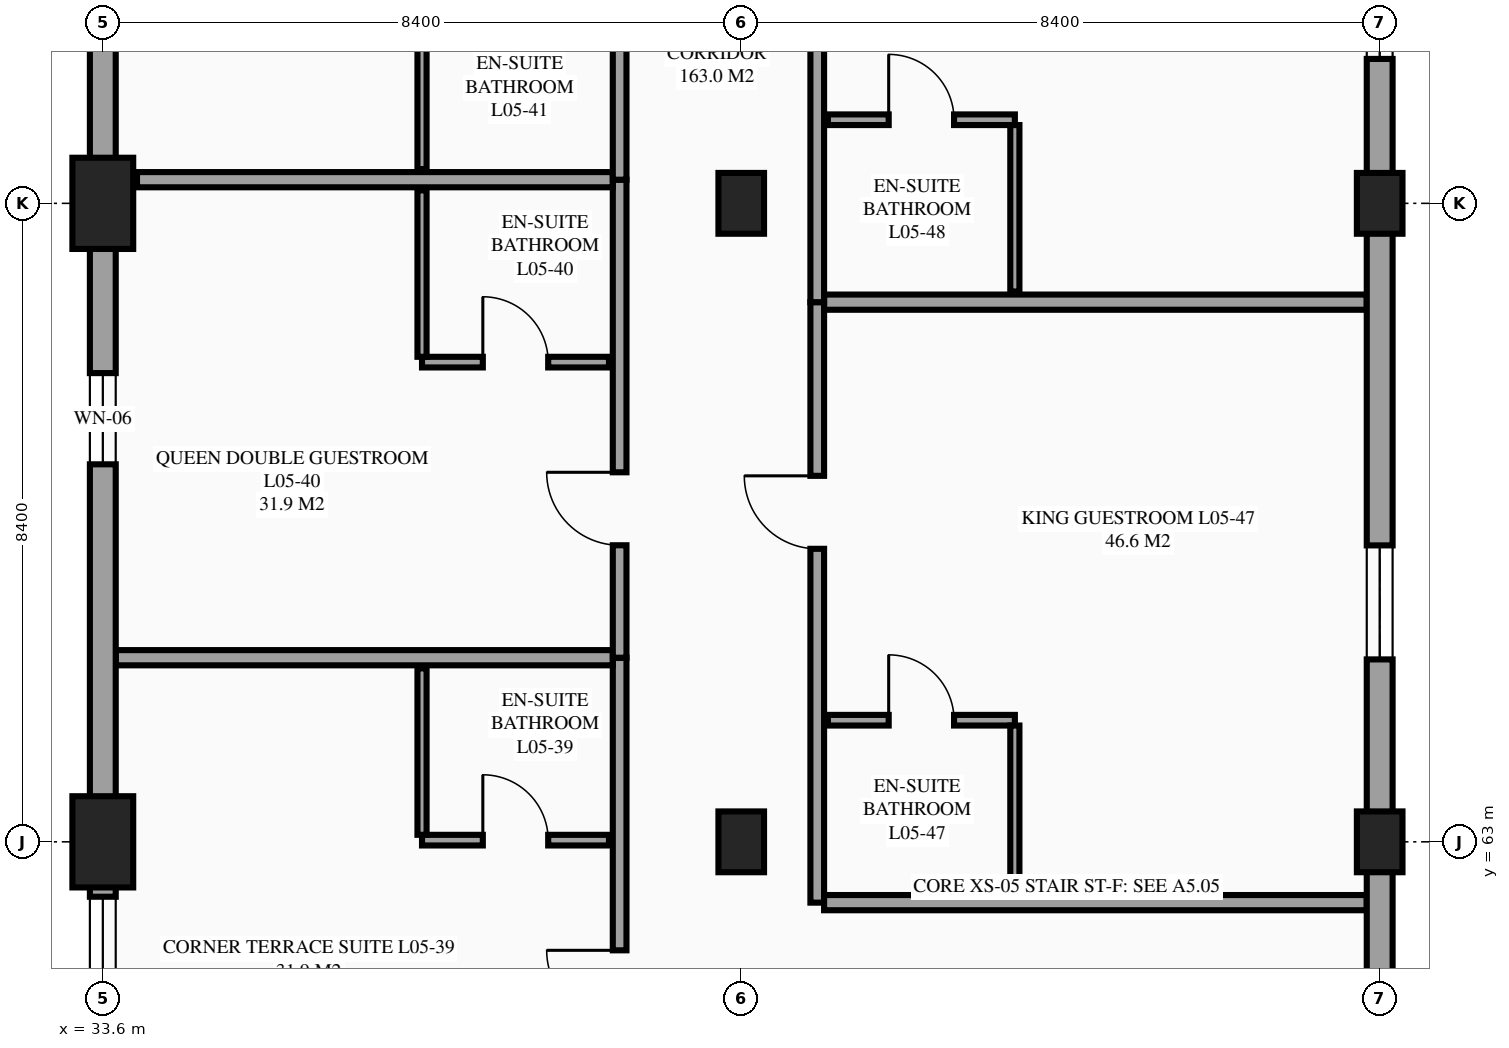
"""IFC4 building model, lengths in metres.
Left out: names, types, materials, properties, quantities, classifications, styles, units other than length and angle.
Written with IfcOpenShell. Run it as: python <this file> out.ifc"""

import sys

from ifc_helpers import new_model, si_unit, direction, frame, frame_2d, origin, origin_2d, place, context, subcontext, project, spatial, rectangle, extrude, element, fill, save


model = new_model("IFC4")
c1 = context("Model", 3, precision=1e-05, world=origin(), true_north=direction((0.0, 1.0)))
c2 = subcontext(c1, "Body", "Model", "MODEL_VIEW")
j1 = project(units=[si_unit("LENGTHUNIT", "METRE"), si_unit("PLANEANGLEUNIT", "RADIAN")], contexts=[c1])
p1 = place(None, origin())
s1 = spatial("IfcSite", under=j1, at=p1, CompositionType="ELEMENT")
p2 = place(p1, origin())
s2 = spatial("IfcBuilding", under=s1, at=p2, CompositionType="ELEMENT")
p3 = place(p2, frame((0.0, 0.0, 21.9)))
s3 = spatial("IfcBuildingStorey", under=s2, at=p3, CompositionType="ELEMENT", Elevation=21.9)
for number, where, z_axis, x_axis in (
    (1, (33.6, 63.0, 0.0), (0.0, 0.0, 1.0), (1.0, 0.0, 0.0)),
    (2, (33.6, 71.4, 0.0), (0.0, 0.0, 1.0), (1.0, 0.0, 0.0)),
):
    element("IfcColumn", number, at=place(p3, frame(where, z_axis=z_axis, x_axis=x_axis)), inside=s3, PredefinedType="COLUMN", context=c2, shape_type="SweptSolid", body=[
        extrude(rectangle(XDim=0.8, YDim=1.2, at=origin_2d()), origin(), (0.0, 0.0, 1.0), 3.6),
    ])
for number, where, z_axis, x_axis in (
    (3, (42.0, 63.0, 0.0), (0.0, 0.0, 1.0), (1.0, 0.0, 0.0)),
    (4, (42.0, 71.4, 0.0), (0.0, 0.0, 1.0), (1.0, 0.0, 0.0)),
    (5, (50.4, 63.0, 0.0), (0.0, 0.0, 1.0), (1.0, 0.0, 0.0)),
    (6, (50.4, 71.4, 0.0), (0.0, 0.0, 1.0), (1.0, 0.0, 0.0)),
):
    element("IfcColumn", number, at=place(p3, frame(where, z_axis=z_axis, x_axis=x_axis)), inside=s3, PredefinedType="COLUMN", context=c2, shape_type="SweptSolid", body=[
        extrude(rectangle(XDim=0.6, YDim=0.8, at=origin_2d()), origin(), (0.0, 0.0, 1.0), 3.6),
    ])
p4 = place(p3, frame((50.4, 71.4, 0.0), z_axis=(0.0, 0.0, 1.0), x_axis=(0.0, 1.0, 0.0)))
e7 = element("IfcWall", 7, at=p4, inside=s3, PredefinedType="STANDARD", context=c2, shape_type="SweptSolid", body=[
    extrude(rectangle(XDim=8.4, YDim=0.34, at=frame_2d((4.2, 0.0))), origin(), (0.0, 0.0, 1.0), 3.126),
])
p5 = place(p4, frame((1.9, 0.0, 0.85)))
e8 = element("IfcOpeningElement", 8, at=p5, cuts=e7, PredefinedType="OPENING", context=c2, shape_type="SweptSolid", body=[
    extrude(rectangle(XDim=1.5, YDim=1.5, at=frame_2d((0.75, 0.75))), frame((0.0, 0.18, 0.0), z_axis=(0.0, -1.0, 0.0), x_axis=(1.0, 0.0, 0.0)), (0.0, 0.0, 1.0), 0.36),
])
p6 = place(p3, frame((40.4, 59.133, 0.0), z_axis=(0.0, 0.0, 1.0), x_axis=(0.0, 1.0, 0.0)))
e9 = element("IfcWall", 9, at=p6, inside=s3, PredefinedType="PARTITIONING", context=c2, shape_type="SweptSolid", body=[
    extrude(rectangle(XDim=6.289, YDim=0.18, at=frame_2d((3.145, 0.0))), origin(), (0.0, 0.0, 1.0), 3.375),
])
p7 = place(p6, frame((1.479, 0.0, 0.0)))
e10 = element("IfcOpeningElement", 10, at=p7, cuts=e9, PredefinedType="OPENING", context=c2, shape_type="SweptSolid", body=[
    extrude(rectangle(XDim=0.96, YDim=2.15, at=frame_2d((0.48, 1.075))), frame((0.0, 0.1, 0.0), z_axis=(0.0, -1.0, 0.0), x_axis=(1.0, 0.0, 0.0)), (0.0, 0.0, 1.0), 0.2),
])
p8 = place(p3, frame((33.77, 65.422, 0.0), z_axis=(0.0, 0.0, 1.0), x_axis=(1.0, 0.0, 0.0)))
e11 = element("IfcWall", 11, at=p8, inside=s3, PredefinedType="PARTITIONING", context=c2, shape_type="SweptSolid", body=[
    extrude(rectangle(XDim=6.54, YDim=0.2, at=frame_2d((3.27, 0.0))), origin(), (0.0, 0.0, 1.0), 3.375),
])
p9 = place(p3, frame((37.8, 63.022, 0.0), z_axis=(0.0, 0.0, 1.0), x_axis=(1.0, 0.0, 0.0)))
e12 = element("IfcWall", 12, at=p9, inside=s3, PredefinedType="PARTITIONING", context=c2, shape_type="SweptSolid", body=[
    extrude(rectangle(XDim=2.46, YDim=0.14, at=frame_2d((1.23, 0.0))), origin(), (0.0, 0.0, 1.0), 2.68),
])
p10 = place(p9, frame((0.8, 0.0, 0.0)))
e13 = element("IfcOpeningElement", 13, at=p10, cuts=e12, PredefinedType="OPENING", context=c2, shape_type="SweptSolid", body=[
    extrude(rectangle(XDim=0.86, YDim=2.1, at=frame_2d((0.43, 1.05))), frame((0.0, 0.08, 0.0), z_axis=(0.0, -1.0, 0.0), x_axis=(1.0, 0.0, 0.0)), (0.0, 0.0, 1.0), 0.16),
])
p11 = place(p3, frame((37.8, 63.092, 0.0), z_axis=(0.0, 0.0, 1.0), x_axis=(0.0, 1.0, 0.0)))
e14 = element("IfcWall", 14, at=p11, inside=s3, PredefinedType="PARTITIONING", context=c2, shape_type="SweptSolid", body=[
    extrude(rectangle(XDim=2.19, YDim=0.12, at=frame_2d((1.095, 0.0))), origin(), (0.0, 0.0, 1.0), 3.375),
])
p12 = place(p3, frame((40.4, 65.422, 0.0), z_axis=(0.0, 0.0, 1.0), x_axis=(0.0, 1.0, 0.0)))
e15 = element("IfcWall", 15, at=p12, inside=s3, PredefinedType="PARTITIONING", context=c2, shape_type="SweptSolid", body=[
    extrude(rectangle(XDim=6.289, YDim=0.18, at=frame_2d((3.145, 0.0))), origin(), (0.0, 0.0, 1.0), 3.375),
])
p13 = place(p12, frame((1.479, 0.0, 0.0)))
e16 = element("IfcOpeningElement", 16, at=p13, cuts=e15, PredefinedType="OPENING", context=c2, shape_type="SweptSolid", body=[
    extrude(rectangle(XDim=0.96, YDim=2.15, at=frame_2d((0.48, 1.075))), frame((0.0, 0.1, 0.0), z_axis=(0.0, -1.0, 0.0), x_axis=(1.0, 0.0, 0.0)), (0.0, 0.0, 1.0), 0.2),
])
p14 = place(p3, frame((34.05, 71.711, 0.0), z_axis=(0.0, 0.0, 1.0), x_axis=(1.0, 0.0, 0.0)))
e17 = element("IfcWall", 17, at=p14, inside=s3, PredefinedType="PARTITIONING", context=c2, shape_type="SweptSolid", body=[
    extrude(rectangle(XDim=6.26, YDim=0.2, at=frame_2d((3.13, 0.0))), origin(), (0.0, 0.0, 1.0), 3.375),
])
p15 = place(p3, frame((37.8, 69.311, 0.0), z_axis=(0.0, 0.0, 1.0), x_axis=(1.0, 0.0, 0.0)))
e18 = element("IfcWall", 18, at=p15, inside=s3, PredefinedType="PARTITIONING", context=c2, shape_type="SweptSolid", body=[
    extrude(rectangle(XDim=2.46, YDim=0.14, at=frame_2d((1.23, 0.0))), origin(), (0.0, 0.0, 1.0), 3.375),
])
p16 = place(p15, frame((0.8, 0.0, 0.0)))
e19 = element("IfcOpeningElement", 19, at=p16, cuts=e18, PredefinedType="OPENING", context=c2, shape_type="SweptSolid", body=[
    extrude(rectangle(XDim=0.86, YDim=2.1, at=frame_2d((0.43, 1.05))), frame((0.0, 0.08, 0.0), z_axis=(0.0, -1.0, 0.0), x_axis=(1.0, 0.0, 0.0)), (0.0, 0.0, 1.0), 0.16),
])
p17 = place(p3, frame((37.8, 69.381, 0.0), z_axis=(0.0, 0.0, 1.0), x_axis=(0.0, 1.0, 0.0)))
e20 = element("IfcWall", 20, at=p17, inside=s3, PredefinedType="PARTITIONING", context=c2, shape_type="SweptSolid", body=[
    extrude(rectangle(XDim=2.19, YDim=0.12, at=frame_2d((1.095, 0.0))), origin(), (0.0, 0.0, 1.0), 3.375),
])
p18 = place(p3, frame((40.4, 71.711, 0.0), z_axis=(0.0, 0.0, 1.0), x_axis=(0.0, 1.0, 0.0)))
e21 = element("IfcWall", 21, at=p18, inside=s3, PredefinedType="PARTITIONING", context=c2, shape_type="SweptSolid", body=[
    extrude(rectangle(XDim=6.289, YDim=0.18, at=frame_2d((3.145, 0.0))), origin(), (0.0, 0.0, 1.0), 3.375),
])
p19 = place(p18, frame((3.849, 0.0, 0.0)))
e22 = element("IfcOpeningElement", 22, at=p19, cuts=e21, PredefinedType="OPENING", context=c2, shape_type="SweptSolid", body=[
    extrude(rectangle(XDim=0.96, YDim=2.15, at=frame_2d((0.48, 1.075))), frame((0.0, 0.1, 0.0), z_axis=(0.0, -1.0, 0.0), x_axis=(1.0, 0.0, 0.0)), (0.0, 0.0, 1.0), 0.2),
])
p20 = place(p3, frame((37.8, 71.851, 0.0), z_axis=(0.0, 0.0, 1.0), x_axis=(0.0, 1.0, 0.0)))
e23 = element("IfcWall", 23, at=p20, inside=s3, PredefinedType="PARTITIONING", context=c2, shape_type="SweptSolid", body=[
    extrude(rectangle(XDim=2.19, YDim=0.12, at=frame_2d((1.095, 0.0))), origin(), (0.0, 0.0, 1.0), 3.375),
])
p21 = place(p3, frame((43.0, 62.2, 0.0), z_axis=(0.0, 0.0, 1.0), x_axis=(0.0, 1.0, 0.0)))
e24 = element("IfcWall", 24, at=p21, inside=s3, PredefinedType="PARTITIONING", context=c2, shape_type="SweptSolid", body=[
    extrude(rectangle(XDim=7.9, YDim=0.18, at=frame_2d((3.95, 0.0))), origin(), (0.0, 0.0, 1.0), 3.375),
])
p22 = place(p21, frame((4.655, 0.0, 0.0)))
e25 = element("IfcOpeningElement", 25, at=p22, cuts=e24, PredefinedType="OPENING", context=c2, shape_type="SweptSolid", body=[
    extrude(rectangle(XDim=0.96, YDim=2.15, at=frame_2d((0.48, 1.075))), frame((0.0, 0.1, 0.0), z_axis=(0.0, -1.0, 0.0), x_axis=(1.0, 0.0, 0.0)), (0.0, 0.0, 1.0), 0.2),
])
for number, where, z_axis, x_axis in (
    (26, (43.09, 62.2, 0.0), (0.0, 0.0, 1.0), (1.0, 0.0, 0.0)),
    (27, (43.09, 70.1, 0.0), (0.0, 0.0, 1.0), (1.0, 0.0, 0.0)),
):
    element("IfcWall", number, at=place(p3, frame(where, z_axis=z_axis, x_axis=x_axis)), inside=s3, PredefinedType="PARTITIONING", context=c2, shape_type="SweptSolid", body=[
        extrude(rectangle(XDim=7.14, YDim=0.2, at=frame_2d((3.57, 0.0))), origin(), (0.0, 0.0, 1.0), 3.375),
    ])
p23 = place(p3, frame((43.14, 64.6, 0.0), z_axis=(0.0, 0.0, 1.0), x_axis=(1.0, 0.0, 0.0)))
e28 = element("IfcWall", 28, at=p23, inside=s3, PredefinedType="PARTITIONING", context=c2, shape_type="SweptSolid", body=[
    extrude(rectangle(XDim=2.46, YDim=0.14, at=frame_2d((1.23, 0.0))), origin(), (0.0, 0.0, 1.0), 3.375),
])
p24 = place(p23, frame((0.8, 0.0, 0.0)))
e29 = element("IfcOpeningElement", 29, at=p24, cuts=e28, PredefinedType="OPENING", context=c2, shape_type="SweptSolid", body=[
    extrude(rectangle(XDim=0.86, YDim=2.1, at=frame_2d((0.43, 1.05))), frame((0.0, 0.08, 0.0), z_axis=(0.0, -1.0, 0.0), x_axis=(1.0, 0.0, 0.0)), (0.0, 0.0, 1.0), 0.16),
])
p25 = place(p3, frame((45.6, 62.34, 0.0), z_axis=(0.0, 0.0, 1.0), x_axis=(0.0, 1.0, 0.0)))
e30 = element("IfcWall", 30, at=p25, inside=s3, PredefinedType="PARTITIONING", context=c2, shape_type="SweptSolid", body=[
    extrude(rectangle(XDim=2.19, YDim=0.12, at=frame_2d((1.095, 0.0))), origin(), (0.0, 0.0, 1.0), 3.375),
])
p26 = place(p3, frame((43.0, 70.1, 0.0), z_axis=(0.0, 0.0, 1.0), x_axis=(0.0, 1.0, 0.0)))
e31 = element("IfcWall", 31, at=p26, inside=s3, PredefinedType="PARTITIONING", context=c2, shape_type="SweptSolid", body=[
    extrude(rectangle(XDim=7.9, YDim=0.18, at=frame_2d((3.95, 0.0))), origin(), (0.0, 0.0, 1.0), 3.375),
])
p27 = place(p26, frame((4.655, 0.0, 0.0)))
e32 = element("IfcOpeningElement", 32, at=p27, cuts=e31, PredefinedType="OPENING", context=c2, shape_type="SweptSolid", body=[
    extrude(rectangle(XDim=0.96, YDim=2.15, at=frame_2d((0.48, 1.075))), frame((0.0, 0.1, 0.0), z_axis=(0.0, -1.0, 0.0), x_axis=(1.0, 0.0, 0.0)), (0.0, 0.0, 1.0), 0.2),
])
p28 = place(p3, frame((43.14, 72.5, 0.0), z_axis=(0.0, 0.0, 1.0), x_axis=(1.0, 0.0, 0.0)))
e33 = element("IfcWall", 33, at=p28, inside=s3, PredefinedType="PARTITIONING", context=c2, shape_type="SweptSolid", body=[
    extrude(rectangle(XDim=2.46, YDim=0.14, at=frame_2d((1.23, 0.0))), origin(), (0.0, 0.0, 1.0), 3.375),
])
p29 = place(p28, frame((0.8, 0.0, 0.0)))
e34 = element("IfcOpeningElement", 34, at=p29, cuts=e33, PredefinedType="OPENING", context=c2, shape_type="SweptSolid", body=[
    extrude(rectangle(XDim=0.86, YDim=2.1, at=frame_2d((0.43, 1.05))), frame((0.0, 0.08, 0.0), z_axis=(0.0, -1.0, 0.0), x_axis=(1.0, 0.0, 0.0)), (0.0, 0.0, 1.0), 0.16),
])
p30 = place(p3, frame((45.6, 70.24, 0.0), z_axis=(0.0, 0.0, 1.0), x_axis=(0.0, 1.0, 0.0)))
e35 = element("IfcWall", 35, at=p30, inside=s3, PredefinedType="PARTITIONING", context=c2, shape_type="SweptSolid", body=[
    extrude(rectangle(XDim=2.19, YDim=0.12, at=frame_2d((1.095, 0.0))), origin(), (0.0, 0.0, 1.0), 3.375),
])
p31 = place(p3, frame((50.4, 60.8, 0.0), z_axis=(0.0, 0.0, 1.0), x_axis=(0.0, 1.0, 0.0)))
e36 = element("IfcWall", 36, at=p31, inside=s3, PredefinedType="STANDARD", context=c2, shape_type="SweptSolid", body=[
    extrude(rectangle(XDim=2.2, YDim=0.34, at=frame_2d((1.1, 0.0))), origin(), (0.0, 0.0, 1.0), 2.48),
])
p32 = place(p3, frame((50.4, 63.0, 0.0), z_axis=(0.0, 0.0, 1.0), x_axis=(0.0, 1.0, 0.0)))
e37 = element("IfcWall", 37, at=p32, inside=s3, PredefinedType="STANDARD", context=c2, shape_type="SweptSolid", body=[
    extrude(rectangle(XDim=8.4, YDim=0.34, at=frame_2d((4.2, 0.0))), origin(), (0.0, 0.0, 1.0), 2.58),
])
p33 = place(p32, frame((2.4, 0.0, 0.85)))
e38 = element("IfcOpeningElement", 38, at=p33, cuts=e37, PredefinedType="OPENING", context=c2, shape_type="SweptSolid", body=[
    extrude(rectangle(XDim=1.5, YDim=1.5, at=frame_2d((0.75, 0.75))), frame((0.0, 0.18, 0.0), z_axis=(0.0, -1.0, 0.0), x_axis=(1.0, 0.0, 0.0)), (0.0, 0.0, 1.0), 0.36),
])
p34 = place(p3, frame((33.6, 79.8, 0.0), z_axis=(0.0, 0.0, 1.0), x_axis=(0.0, -1.0, 0.0)))
e39 = element("IfcWall", 39, at=p34, inside=s3, PredefinedType="STANDARD", context=c2, shape_type="SweptSolid", body=[
    extrude(rectangle(XDim=16.8, YDim=0.34, at=frame_2d((8.4, 0.0))), origin(), (0.0, 0.0, 1.0), 2.63),
])
p35 = place(p34, frame((10.633, 0.0, 0.85)))
e40 = element("IfcOpeningElement", 40, at=p35, cuts=e39, PredefinedType="OPENING", context=c2, shape_type="SweptSolid", body=[
    extrude(rectangle(XDim=1.2, YDim=1.5, at=frame_2d((0.6, 0.75))), frame((0.0, 0.18, 0.0), z_axis=(0.0, -1.0, 0.0), x_axis=(1.0, 0.0, 0.0)), (0.0, 0.0, 1.0), 0.36),
])
p36 = place(p34, frame((4.195, 0.0, 0.85)))
e41 = element("IfcOpeningElement", 41, at=p36, cuts=e39, PredefinedType="OPENING", context=c2, shape_type="SweptSolid", body=[
    extrude(rectangle(XDim=1.5, YDim=1.5, at=frame_2d((0.75, 0.75))), frame((0.0, 0.18, 0.0), z_axis=(0.0, -1.0, 0.0), x_axis=(1.0, 0.0, 0.0)), (0.0, 0.0, 1.0), 0.36),
])
p37 = place(p3, frame((33.6, 63.0, 0.0), z_axis=(0.0, 0.0, 1.0), x_axis=(0.0, -1.0, 0.0)))
e42 = element("IfcWall", 42, at=p37, inside=s3, PredefinedType="STANDARD", context=c2, shape_type="SweptSolid", body=[
    extrude(rectangle(XDim=8.4, YDim=0.34, at=frame_2d((4.2, 0.0))), origin(), (0.0, 0.0, 1.0), 3.126),
])
p38 = place(p37, frame((6.261, 0.0, 0.85)))
e43 = element("IfcOpeningElement", 43, at=p38, cuts=e42, PredefinedType="OPENING", context=c2, shape_type="SweptSolid", body=[
    extrude(rectangle(XDim=1.5, YDim=1.5, at=frame_2d((0.75, 0.75))), frame((0.0, 0.18, 0.0), z_axis=(0.0, -1.0, 0.0), x_axis=(1.0, 0.0, 0.0)), (0.0, 0.0, 1.0), 0.36),
])
p39 = place(p37, frame((0.722, 0.0, 0.85)))
e44 = element("IfcOpeningElement", 44, at=p39, cuts=e42, PredefinedType="OPENING", context=c2, shape_type="SweptSolid", body=[
    extrude(rectangle(XDim=1.5, YDim=1.5, at=frame_2d((0.75, 0.75))), frame((0.0, 0.18, 0.0), z_axis=(0.0, -1.0, 0.0), x_axis=(1.0, 0.0, 0.0)), (0.0, 0.0, 1.0), 0.36),
])
p40 = place(p39, origin())
e45 = element("IfcWindow", 45, at=p40, inside=s3, PartitioningType="SINGLE_PANEL", PredefinedType="WINDOW", context=c2, shape_type="SweptSolid", body=[
    extrude(rectangle(XDim=1.5, YDim=1.5, at=frame_2d((0.75, 0.75))), frame((0.0, 0.03, 0.0), z_axis=(0.0, -1.0, 0.0), x_axis=(1.0, 0.0, 0.0)), (0.0, 0.0, 1.0), 0.06),
])
fill(e44, e45)
p41 = place(p35, origin())
e46 = element("IfcWindow", 46, at=p41, inside=s3, PartitioningType="SINGLE_PANEL", PredefinedType="WINDOW", context=c2, shape_type="SweptSolid", body=[
    extrude(rectangle(XDim=1.2, YDim=1.5, at=frame_2d((0.6, 0.75))), frame((0.0, 0.03, 0.0), z_axis=(0.0, -1.0, 0.0), x_axis=(1.0, 0.0, 0.0)), (0.0, 0.0, 1.0), 0.06),
])
fill(e40, e46)
p42 = place(p33, origin())
e47 = element("IfcWindow", 47, at=p42, inside=s3, PartitioningType="SINGLE_PANEL", PredefinedType="WINDOW", context=c2, shape_type="SweptSolid", body=[
    extrude(rectangle(XDim=1.5, YDim=1.5, at=frame_2d((0.75, 0.75))), frame((0.0, 0.03, 0.0), z_axis=(0.0, -1.0, 0.0), x_axis=(1.0, 0.0, 0.0)), (0.0, 0.0, 1.0), 0.06),
])
fill(e38, e47)
p43 = place(p5, origin())
e48 = element("IfcWindow", 48, at=p43, inside=s3, PartitioningType="SINGLE_PANEL", PredefinedType="WINDOW", context=c2, shape_type="SweptSolid", body=[
    extrude(rectangle(XDim=1.5, YDim=1.5, at=frame_2d((0.75, 0.75))), frame((0.0, 0.03, 0.0), z_axis=(0.0, -1.0, 0.0), x_axis=(1.0, 0.0, 0.0)), (0.0, 0.0, 1.0), 0.06),
])
fill(e8, e48)
p44 = place(p7, origin())
e49 = element("IfcDoor", 49, at=p44, inside=s3, OperationType="SINGLE_SWING_RIGHT", PredefinedType="DOOR", context=c2, shape_type="SweptSolid", body=[
    extrude(rectangle(XDim=0.96, YDim=2.15, at=frame_2d((0.48, 1.075))), frame((0.0, 0.025, 0.0), z_axis=(0.0, -1.0, 0.0), x_axis=(1.0, 0.0, 0.0)), (0.0, 0.0, 1.0), 0.05),
])
fill(e10, e49)
p45 = place(p10, origin())
e50 = element("IfcDoor", 50, at=p45, inside=s3, OperationType="SINGLE_SWING_LEFT", PredefinedType="DOOR", context=c2, shape_type="SweptSolid", body=[
    extrude(rectangle(XDim=0.86, YDim=2.1, at=frame_2d((0.43, 1.05))), frame((0.0, 0.025, 0.0), z_axis=(0.0, -1.0, 0.0), x_axis=(1.0, 0.0, 0.0)), (0.0, 0.0, 1.0), 0.05),
])
fill(e13, e50)
p46 = place(p13, origin())
e51 = element("IfcDoor", 51, at=p46, inside=s3, OperationType="SINGLE_SWING_RIGHT", PredefinedType="DOOR", context=c2, shape_type="SweptSolid", body=[
    extrude(rectangle(XDim=0.96, YDim=2.15, at=frame_2d((0.48, 1.075))), frame((0.0, 0.025, 0.0), z_axis=(0.0, -1.0, 0.0), x_axis=(1.0, 0.0, 0.0)), (0.0, 0.0, 1.0), 0.05),
])
fill(e16, e51)
p47 = place(p16, origin())
e52 = element("IfcDoor", 52, at=p47, inside=s3, OperationType="SINGLE_SWING_LEFT", PredefinedType="DOOR", context=c2, shape_type="SweptSolid", body=[
    extrude(rectangle(XDim=0.86, YDim=2.1, at=frame_2d((0.43, 1.05))), frame((0.0, 0.025, 0.0), z_axis=(0.0, -1.0, 0.0), x_axis=(1.0, 0.0, 0.0)), (0.0, 0.0, 1.0), 0.05),
])
fill(e19, e52)
p48 = place(p22, origin())
e53 = element("IfcDoor", 53, at=p48, inside=s3, OperationType="SINGLE_SWING_RIGHT", PredefinedType="DOOR", context=c2, shape_type="SweptSolid", body=[
    extrude(rectangle(XDim=0.96, YDim=2.15, at=frame_2d((0.48, 1.075))), frame((0.0, 0.025, 0.0), z_axis=(0.0, -1.0, 0.0), x_axis=(1.0, 0.0, 0.0)), (0.0, 0.0, 1.0), 0.05),
])
fill(e25, e53)
p49 = place(p24, origin())
e54 = element("IfcDoor", 54, at=p49, inside=s3, OperationType="SINGLE_SWING_LEFT", PredefinedType="DOOR", context=c2, shape_type="SweptSolid", body=[
    extrude(rectangle(XDim=0.86, YDim=2.1, at=frame_2d((0.43, 1.05))), frame((0.0, 0.025, 0.0), z_axis=(0.0, -1.0, 0.0), x_axis=(1.0, 0.0, 0.0)), (0.0, 0.0, 1.0), 0.05),
])
fill(e29, e54)
p50 = place(p29, origin())
e55 = element("IfcDoor", 55, at=p50, inside=s3, OperationType="SINGLE_SWING_LEFT", PredefinedType="DOOR", context=c2, shape_type="SweptSolid", body=[
    extrude(rectangle(XDim=0.86, YDim=2.1, at=frame_2d((0.43, 1.05))), frame((0.0, 0.025, 0.0), z_axis=(0.0, -1.0, 0.0), x_axis=(1.0, 0.0, 0.0)), (0.0, 0.0, 1.0), 0.05),
])
fill(e34, e55)
save(model, sys.argv[1])
